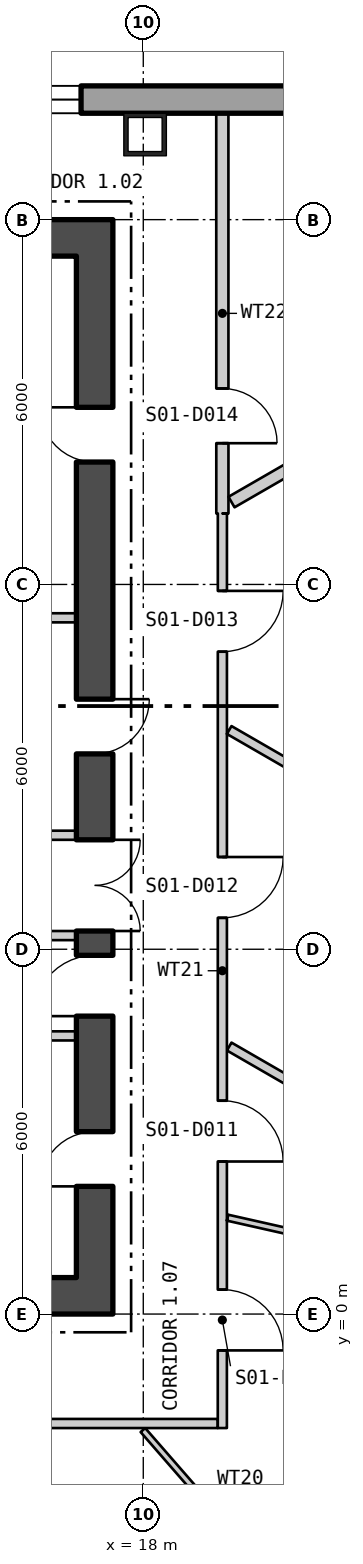
"""IFC4 building model, lengths in metres.
Left out: names, types, materials, properties, quantities, classifications, styles, units other than length and angle.
Written with IfcOpenShell. Run it as: python <this file> out.ifc"""

import sys

from ifc_helpers import new_model, si_unit, direction, frame, frame_2d, origin, origin_2d, place, context, subcontext, project, spatial, polyline, rectangle, hollow_rectangle, outline, extrude, element, fill, save


model = new_model("IFC4")
c1 = context("Model", 3, precision=1e-05, world=origin(), true_north=direction((0.0, 1.0)))
c2 = subcontext(c1, "Body", "Model", "MODEL_VIEW")
j1 = project(units=[si_unit("LENGTHUNIT", "METRE"), si_unit("PLANEANGLEUNIT", "RADIAN")], contexts=[c1])
p1 = place(None, origin())
s1 = spatial("IfcSite", under=j1, at=p1, CompositionType="ELEMENT")
p2 = place(p1, origin())
s2 = spatial("IfcBuilding", under=s1, at=p2, CompositionType="ELEMENT")
p3 = place(p2, frame((0.0, 0.0, 28.8)))
s3 = spatial("IfcBuildingStorey", under=s2, at=p3, CompositionType="ELEMENT", Elevation=28.8)
p4 = place(p3, frame((18.03, 19.4, -0.85), z_axis=(0.0, 0.0, 1.0), x_axis=(-1.0, 0.0, 0.0)))
e1 = element("IfcColumn", 1, at=p4, inside=s3, PredefinedType="COLUMN", context=c2, shape_type="SweptSolid", body=[
    extrude(hollow_rectangle(XDim=0.7, YDim=0.7, WallThickness=0.07, at=origin_2d()), origin(), (0.0, 0.0, 1.0), 5.35),
])
p5 = place(p3, frame((22.87, 19.975, -0.4), z_axis=(0.0, 0.0, 1.0), x_axis=(-1.0, 0.0, 0.0)))
e2 = element("IfcWall", 2, at=p5, inside=s3, PredefinedType="SOLIDWALL", context=c2, shape_type="SweptSolid", body=[
    extrude(outline(polyline([(-0.13, -0.225), (45.87, -0.225), (45.61, 0.225), (0.13, 0.225), (-0.13, -0.225)])), origin(), (0.0, 0.0, 1.0), 4.5),
])
p6 = place(p5, frame((5.893, 0.0, 1.3)))
e3 = element("IfcOpeningElement", 3, at=p6, cuts=e2, PredefinedType="OPENING", context=c2, shape_type="SweptSolid", body=[
    extrude(rectangle(XDim=2.4, YDim=2.6, at=frame_2d((1.2, 1.3))), frame((0.0, 0.235, 0.0), z_axis=(0.0, -1.0, 0.0), x_axis=(1.0, 0.0, 0.0)), (0.0, 0.0, 1.0), 0.47),
])
p7 = place(p5, frame((10.401, 0.0, 1.3)))
e4 = element("IfcOpeningElement", 4, at=p7, cuts=e2, PredefinedType="OPENING", context=c2, shape_type="SweptSolid", body=[
    extrude(rectangle(XDim=2.4, YDim=2.6, at=frame_2d((1.2, 1.3))), frame((0.0, 0.235, 0.0), z_axis=(0.0, -1.0, 0.0), x_axis=(1.0, 0.0, 0.0)), (0.0, 0.0, 1.0), 0.47),
])
p8 = place(p5, frame((14.909, 0.0, 1.3)))
e5 = element("IfcOpeningElement", 5, at=p8, cuts=e2, PredefinedType="OPENING", context=c2, shape_type="SweptSolid", body=[
    extrude(rectangle(XDim=2.4, YDim=2.6, at=frame_2d((1.2, 1.3))), frame((0.0, 0.235, 0.0), z_axis=(0.0, -1.0, 0.0), x_axis=(1.0, 0.0, 0.0)), (0.0, 0.0, 1.0), 0.47),
])
p9 = place(p5, frame((19.416, 0.0, 1.3)))
e6 = element("IfcOpeningElement", 6, at=p9, cuts=e2, PredefinedType="OPENING", context=c2, shape_type="SweptSolid", body=[
    extrude(rectangle(XDim=2.4, YDim=2.6, at=frame_2d((1.2, 1.3))), frame((0.0, 0.235, 0.0), z_axis=(0.0, -1.0, 0.0), x_axis=(1.0, 0.0, 0.0)), (0.0, 0.0, 1.0), 0.47),
])
p10 = place(p5, frame((23.924, 0.0, 1.3)))
e7 = element("IfcOpeningElement", 7, at=p10, cuts=e2, PredefinedType="OPENING", context=c2, shape_type="SweptSolid", body=[
    extrude(rectangle(XDim=2.4, YDim=2.6, at=frame_2d((1.2, 1.3))), frame((0.0, 0.235, 0.0), z_axis=(0.0, -1.0, 0.0), x_axis=(1.0, 0.0, 0.0)), (0.0, 0.0, 1.0), 0.47),
])
p11 = place(p5, frame((28.431, 0.0, 1.3)))
e8 = element("IfcOpeningElement", 8, at=p11, cuts=e2, PredefinedType="OPENING", context=c2, shape_type="SweptSolid", body=[
    extrude(rectangle(XDim=2.4, YDim=2.6, at=frame_2d((1.2, 1.3))), frame((0.0, 0.235, 0.0), z_axis=(0.0, -1.0, 0.0), x_axis=(1.0, 0.0, 0.0)), (0.0, 0.0, 1.0), 0.47),
])
p12 = place(p5, frame((32.939, 0.0, 1.3)))
e9 = element("IfcOpeningElement", 9, at=p12, cuts=e2, PredefinedType="OPENING", context=c2, shape_type="SweptSolid", body=[
    extrude(rectangle(XDim=2.4, YDim=2.6, at=frame_2d((1.2, 1.3))), frame((0.0, 0.235, 0.0), z_axis=(0.0, -1.0, 0.0), x_axis=(1.0, 0.0, 0.0)), (0.0, 0.0, 1.0), 0.47),
])
p13 = place(p5, frame((37.447, 0.0, 1.3)))
e10 = element("IfcOpeningElement", 10, at=p13, cuts=e2, PredefinedType="OPENING", context=c2, shape_type="SweptSolid", body=[
    extrude(rectangle(XDim=2.4, YDim=2.6, at=frame_2d((1.2, 1.3))), frame((0.0, 0.235, 0.0), z_axis=(0.0, -1.0, 0.0), x_axis=(1.0, 0.0, 0.0)), (0.0, 0.0, 1.0), 0.47),
])
p14 = place(p3, frame((5.87, -29.805, -0.23), z_axis=(0.0, 0.0, 1.0), x_axis=(0.499999764979, 0.866025539474, 0.0)))
e11 = element("IfcWall", 11, at=p14, inside=s3, PredefinedType="SOLIDWALL", context=c2, shape_type="SweptSolid", body=[
    extrude(outline(polyline([(-0.13, -0.225), (45.87, -0.225), (45.61, 0.225), (0.13, 0.225), (-0.13, -0.225)])), origin(), (0.0, 0.0, 1.0), 4.55),
])
p15 = place(p14, frame((1.424, 0.0, 1.13)))
e12 = element("IfcOpeningElement", 12, at=p15, cuts=e11, PredefinedType="OPENING", context=c2, shape_type="SweptSolid", body=[
    extrude(rectangle(XDim=2.4, YDim=2.6, at=frame_2d((1.2, 1.3))), frame((0.0, 0.235, 0.0), z_axis=(0.0, -1.0, 0.0), x_axis=(1.0, 0.0, 0.0)), (0.0, 0.0, 1.0), 0.47),
])
p16 = place(p14, frame((5.893, 0.0, 1.13)))
e13 = element("IfcOpeningElement", 13, at=p16, cuts=e11, PredefinedType="OPENING", context=c2, shape_type="SweptSolid", body=[
    extrude(rectangle(XDim=2.4, YDim=2.6, at=frame_2d((1.2, 1.3))), frame((0.0, 0.235, 0.0), z_axis=(0.0, -1.0, 0.0), x_axis=(1.0, 0.0, 0.0)), (0.0, 0.0, 1.0), 0.47),
])
p17 = place(p14, frame((10.701, 0.0, 0.23)))
e14 = element("IfcOpeningElement", 14, at=p17, cuts=e11, PredefinedType="OPENING", context=c2, shape_type="SweptSolid", body=[
    extrude(rectangle(XDim=1.8, YDim=2.4, at=frame_2d((0.9, 1.2))), frame((0.0, 0.235, 0.0), z_axis=(0.0, -1.0, 0.0), x_axis=(1.0, 0.0, 0.0)), (0.0, 0.0, 1.0), 0.47),
])
p18 = place(p14, frame((14.909, 0.0, 1.13)))
e15 = element("IfcOpeningElement", 15, at=p18, cuts=e11, PredefinedType="OPENING", context=c2, shape_type="SweptSolid", body=[
    extrude(rectangle(XDim=2.4, YDim=2.6, at=frame_2d((1.2, 1.3))), frame((0.0, 0.235, 0.0), z_axis=(0.0, -1.0, 0.0), x_axis=(1.0, 0.0, 0.0)), (0.0, 0.0, 1.0), 0.47),
])
p19 = place(p14, frame((19.416, 0.0, 1.13)))
e16 = element("IfcOpeningElement", 16, at=p19, cuts=e11, PredefinedType="OPENING", context=c2, shape_type="SweptSolid", body=[
    extrude(rectangle(XDim=2.4, YDim=2.6, at=frame_2d((1.2, 1.3))), frame((0.0, 0.235, 0.0), z_axis=(0.0, -1.0, 0.0), x_axis=(1.0, 0.0, 0.0)), (0.0, 0.0, 1.0), 0.47),
])
p20 = place(p14, frame((23.924, 0.0, 1.13)))
e17 = element("IfcOpeningElement", 17, at=p20, cuts=e11, PredefinedType="OPENING", context=c2, shape_type="SweptSolid", body=[
    extrude(rectangle(XDim=2.4, YDim=2.6, at=frame_2d((1.2, 1.3))), frame((0.0, 0.235, 0.0), z_axis=(0.0, -1.0, 0.0), x_axis=(1.0, 0.0, 0.0)), (0.0, 0.0, 1.0), 0.47),
])
p21 = place(p14, frame((37.447, 0.0, 1.13)))
e18 = element("IfcOpeningElement", 18, at=p21, cuts=e11, PredefinedType="OPENING", context=c2, shape_type="SweptSolid", body=[
    extrude(rectangle(XDim=2.4, YDim=2.6, at=frame_2d((1.2, 1.3))), frame((0.0, 0.235, 0.0), z_axis=(0.0, -1.0, 0.0), x_axis=(1.0, 0.0, 0.0)), (0.0, 0.0, 1.0), 0.47),
])
p22 = place(p14, frame((42.216, 0.0, 0.23)))
e19 = element("IfcOpeningElement", 19, at=p22, cuts=e11, PredefinedType="OPENING", context=c2, shape_type="SweptSolid", body=[
    extrude(rectangle(XDim=1.8, YDim=2.4, at=frame_2d((0.9, 1.2))), frame((0.0, 0.235, 0.0), z_axis=(0.0, -1.0, 0.0), x_axis=(1.0, 0.0, 0.0)), (0.0, 0.0, 1.0), 0.47),
])
p23 = place(p3, frame((-17.5, 0.3, 0.0), z_axis=(0.0, 0.0, 1.0), x_axis=(1.0, 0.0, 0.0)))
e20 = element("IfcWall", 20, at=p23, inside=s3, PredefinedType="SHEAR", context=c2, shape_type="SweptSolid", body=[
    extrude(rectangle(XDim=35.0, YDim=0.6, at=frame_2d((17.5, 0.0))), origin(), (0.0, 0.0, 1.0), 4.3),
])
p24 = place(p23, frame((12.0, 0.0, 0.0)))
e21 = element("IfcOpeningElement", 21, at=p24, cuts=e20, PredefinedType="OPENING", context=c2, shape_type="SweptSolid", body=[
    extrude(rectangle(XDim=1.8, YDim=2.4, at=frame_2d((0.9, 1.2))), frame((0.0, 0.31, 0.0), z_axis=(0.0, -1.0, 0.0), x_axis=(1.0, 0.0, 0.0)), (0.0, 0.0, 1.0), 0.62),
])
p25 = place(p23, frame((22.0, 0.0, 0.0)))
e22 = element("IfcOpeningElement", 22, at=p25, cuts=e20, PredefinedType="OPENING", context=c2, shape_type="SweptSolid", body=[
    extrude(rectangle(XDim=1.8, YDim=2.4, at=frame_2d((0.9, 1.2))), frame((0.0, 0.31, 0.0), z_axis=(0.0, -1.0, 0.0), x_axis=(1.0, 0.0, 0.0)), (0.0, 0.0, 1.0), 0.62),
])
p26 = place(p3, frame((-17.5, 17.7, 0.0), z_axis=(0.0, 0.0, 1.0), x_axis=(1.0, 0.0, 0.0)))
e23 = element("IfcWall", 23, at=p26, inside=s3, PredefinedType="SHEAR", context=c2, shape_type="SweptSolid", body=[
    extrude(rectangle(XDim=35.0, YDim=0.6, at=frame_2d((17.5, 0.0))), origin(), (0.0, 0.0, 1.0), 4.3),
])
p27 = place(p3, frame((17.2, 0.6, 0.0), z_axis=(0.0, 0.0, 1.0), x_axis=(0.0, 1.0, 0.0)))
e24 = element("IfcWall", 24, at=p27, inside=s3, PredefinedType="SHEAR", context=c2, shape_type="SweptSolid", body=[
    extrude(rectangle(XDim=16.8, YDim=0.6, at=frame_2d((8.4, 0.0))), origin(), (0.0, 0.0, 1.0), 4.3),
])
p28 = place(p27, frame((5.7, 0.0, 0.0)))
e25 = element("IfcOpeningElement", 25, at=p28, cuts=e24, PredefinedType="OPENING", context=c2, shape_type="SweptSolid", body=[
    extrude(rectangle(XDim=1.5, YDim=2.1, at=frame_2d((0.75, 1.05))), frame((0.0, 0.31, 0.0), z_axis=(0.0, -1.0, 0.0), x_axis=(1.0, 0.0, 0.0)), (0.0, 0.0, 1.0), 0.62),
])
p29 = place(p27, frame((1.5, 0.0, 0.0)))
e26 = element("IfcOpeningElement", 26, at=p29, cuts=e24, PredefinedType="OPENING", context=c2, shape_type="SweptSolid", body=[
    extrude(rectangle(XDim=0.9, YDim=2.1, at=frame_2d((0.45, 1.05))), frame((0.0, 0.31, 0.0), z_axis=(0.0, -1.0, 0.0), x_axis=(1.0, 0.0, 0.0)), (0.0, 0.0, 1.0), 0.62),
])
p30 = place(p27, frame((4.3, 0.0, 0.0)))
e27 = element("IfcOpeningElement", 27, at=p30, cuts=e24, PredefinedType="OPENING", context=c2, shape_type="SweptSolid", body=[
    extrude(rectangle(XDim=1.0, YDim=2.1, at=frame_2d((0.5, 1.05))), frame((0.0, 0.31, 0.0), z_axis=(0.0, -1.0, 0.0), x_axis=(1.0, 0.0, 0.0)), (0.0, 0.0, 1.0), 0.62),
])
p31 = place(p27, frame((8.613, 0.0, 0.0)))
e28 = element("IfcOpeningElement", 28, at=p31, cuts=e24, PredefinedType="OPENING", context=c2, shape_type="SweptSolid", body=[
    extrude(rectangle(XDim=0.9, YDim=2.1, at=frame_2d((0.45, 1.05))), frame((0.0, 0.31, 0.0), z_axis=(0.0, -1.0, 0.0), x_axis=(1.0, 0.0, 0.0)), (0.0, 0.0, 1.0), 0.62),
])
p32 = place(p27, frame((13.413, 0.0, 0.0)))
e29 = element("IfcOpeningElement", 29, at=p32, cuts=e24, PredefinedType="OPENING", context=c2, shape_type="SweptSolid", body=[
    extrude(rectangle(XDim=0.9, YDim=2.1, at=frame_2d((0.45, 1.05))), frame((0.0, 0.31, 0.0), z_axis=(0.0, -1.0, 0.0), x_axis=(1.0, 0.0, 0.0)), (0.0, 0.0, 1.0), 0.62),
])
for number, where, z_axis, x_axis in (
    (30, (14.5, 6.225, 0.0), (0.0, 0.0, 1.0), (1.0, 0.0, 0.0)),
    (31, (14.5, 7.875, 0.0), (0.0, 0.0, 1.0), (1.0, 0.0, 0.0)),
    (32, (14.5, 4.575, 0.0), (0.0, 0.0, 1.0), (1.0, 0.0, 0.0)),
    (33, (14.5, 11.451, 0.0), (0.0, 0.0, 1.0), (1.0, 0.0, 0.0)),
):
    element("IfcWall", number, at=place(p3, frame(where, z_axis=z_axis, x_axis=x_axis)), inside=s3, PredefinedType="PARTITIONING", context=c2, shape_type="SweptSolid", body=[
        extrude(rectangle(XDim=2.4, YDim=0.15, at=frame_2d((1.2, 0.0))), origin(), (0.0, 0.0, 1.0), 4.3),
    ])
p33 = place(p3, frame((8.075, -1.8, 0.0), z_axis=(0.0, 0.0, 1.0), x_axis=(1.0, 0.0, 0.0)))
e34 = element("IfcWall", 34, at=p33, inside=s3, PredefinedType="PARTITIONING", context=c2, shape_type="SweptSolid", body=[
    extrude(rectangle(XDim=11.15, YDim=0.15, at=frame_2d((5.575, 0.0))), origin(), (0.0, 0.0, 1.0), 4.3),
])
p34 = place(p33, frame((2.845, 0.0, 0.0)))
e35 = element("IfcOpeningElement", 35, at=p34, cuts=e34, PredefinedType="OPENING", context=c2, shape_type="SweptSolid", body=[
    extrude(rectangle(XDim=1.0, YDim=2.1, at=frame_2d((0.5, 1.05))), frame((0.0, 0.085, 0.0), z_axis=(0.0, -1.0, 0.0), x_axis=(1.0, 0.0, 0.0)), (0.0, 0.0, 1.0), 0.17),
])
p35 = place(p33, frame((6.395, 0.0, 0.0)))
e36 = element("IfcOpeningElement", 36, at=p35, cuts=e34, PredefinedType="OPENING", context=c2, shape_type="SweptSolid", body=[
    extrude(rectangle(XDim=1.0, YDim=2.1, at=frame_2d((0.5, 1.05))), frame((0.0, 0.085, 0.0), z_axis=(0.0, -1.0, 0.0), x_axis=(1.0, 0.0, 0.0)), (0.0, 0.0, 1.0), 0.17),
])
p36 = place(p3, frame((12.326, -1.918, 0.0), z_axis=(0.0, 0.0, 1.0), x_axis=(0.866014233227, -0.500019347474, 0.0)))
e37 = element("IfcWall", 37, at=p36, inside=s3, PredefinedType="PARTITIONING", context=c2, shape_type="SweptSolid", body=[
    extrude(rectangle(XDim=7.678, YDim=0.1, at=frame_2d((3.839, 0.0))), origin(), (0.0, 0.0, 1.0), 4.3),
])
p37 = place(p3, frame((17.994, -1.908, 0.0), z_axis=(0.0, 0.0, 1.0), x_axis=(0.656716151121, -0.754137850036, 0.0)))
e38 = element("IfcWall", 38, at=p37, inside=s3, PredefinedType="PARTITIONING", context=c2, shape_type="SweptSolid", body=[
    extrude(rectangle(XDim=3.408, YDim=0.1, at=frame_2d((1.704, 0.0))), origin(), (0.0, 0.0, 1.0), 4.3),
])
p38 = place(p3, frame((19.3, -1.875, 0.0), z_axis=(0.0, 0.0, 1.0), x_axis=(6.6476102e-05, 0.99999999779, 0.0)))
e39 = element("IfcWall", 39, at=p38, inside=s3, PredefinedType="PARTITIONING", context=c2, shape_type="SweptSolid", body=[
    extrude(rectangle(XDim=15.043, YDim=0.15, at=frame_2d((7.521, 0.0))), origin(), (0.0, 0.0, 1.0), 4.3),
])
p39 = place(p38, frame((1.277, 0.0, 0.0)))
e40 = element("IfcOpeningElement", 40, at=p39, cuts=e39, PredefinedType="OPENING", context=c2, shape_type="SweptSolid", body=[
    extrude(rectangle(XDim=1.0, YDim=2.1, at=frame_2d((0.5, 1.05))), frame((0.0, 0.085, 0.0), z_axis=(0.0, -1.0, 0.0), x_axis=(1.0, 0.0, 0.0)), (0.0, 0.0, 1.0), 0.17),
])
p40 = place(p38, frame((4.384, 0.0, 0.0)))
e41 = element("IfcOpeningElement", 41, at=p40, cuts=e39, PredefinedType="OPENING", context=c2, shape_type="SweptSolid", body=[
    extrude(rectangle(XDim=1.0, YDim=2.1, at=frame_2d((0.5, 1.05))), frame((0.0, 0.085, 0.0), z_axis=(0.0, -1.0, 0.0), x_axis=(1.0, 0.0, 0.0)), (0.0, 0.0, 1.0), 0.17),
])
p41 = place(p38, frame((8.392, 0.0, 0.0)))
e42 = element("IfcOpeningElement", 42, at=p41, cuts=e39, PredefinedType="OPENING", context=c2, shape_type="SweptSolid", body=[
    extrude(rectangle(XDim=1.0, YDim=2.1, at=frame_2d((0.5, 1.05))), frame((0.0, 0.085, 0.0), z_axis=(0.0, -1.0, 0.0), x_axis=(1.0, 0.0, 0.0)), (0.0, 0.0, 1.0), 0.17),
])
p42 = place(p38, frame((12.769, 0.0, 0.0)))
e43 = element("IfcOpeningElement", 43, at=p42, cuts=e39, PredefinedType="OPENING", context=c2, shape_type="SweptSolid", body=[
    extrude(rectangle(XDim=1.0, YDim=2.1, at=frame_2d((0.5, 1.05))), frame((0.0, 0.085, 0.0), z_axis=(0.0, -1.0, 0.0), x_axis=(1.0, 0.0, 0.0)), (0.0, 0.0, 1.0), 0.17),
])
p43 = place(p3, frame((19.3, 19.749, 0.0), z_axis=(0.0, 0.0, 1.0), x_axis=(0.000151952589, -0.999999988455, 0.0)))
e44 = element("IfcWall", 44, at=p43, inside=s3, PredefinedType="PARTITIONING", context=c2, shape_type="SweptSolid", body=[
    extrude(rectangle(XDim=6.581, YDim=0.2, at=frame_2d((3.291, 0.0))), origin(), (0.0, 0.0, 1.0), 4.3),
])
p44 = place(p43, frame((4.526, 0.0, 0.0)))
e45 = element("IfcOpeningElement", 45, at=p44, cuts=e44, PredefinedType="OPENING", context=c2, shape_type="SweptSolid", body=[
    extrude(rectangle(XDim=0.9, YDim=2.1, at=frame_2d((0.45, 1.05))), frame((0.0, 0.11, 0.0), z_axis=(0.0, -1.0, 0.0), x_axis=(1.0, 0.0, 0.0)), (0.0, 0.0, 1.0), 0.22),
])
p45 = place(p3, frame((19.386, 1.585, 0.0), z_axis=(0.0, 0.0, 1.0), x_axis=(0.975507775366, -0.219964952209, 0.0)))
e46 = element("IfcWall", 46, at=p45, inside=s3, PredefinedType="PARTITIONING", context=c2, shape_type="SweptSolid", body=[
    extrude(rectangle(XDim=3.942, YDim=0.1, at=frame_2d((1.971, 0.0))), origin(), (0.0, 0.0, 1.0), 4.3),
])
p46 = place(p3, frame((19.413, 4.4, 0.0), z_axis=(0.0, 0.0, 1.0), x_axis=(0.865955197451, -0.500121581226, 0.0)))
e47 = element("IfcWall", 47, at=p46, inside=s3, PredefinedType="PARTITIONING", context=c2, shape_type="SweptSolid", body=[
    extrude(rectangle(XDim=4.699, YDim=0.15, at=frame_2d((2.349, 0.0))), origin(), (0.0, 0.0, 1.0), 4.3),
])
p47 = place(p3, frame((19.413, 9.606, 0.0), z_axis=(0.0, 0.0, 1.0), x_axis=(0.865941524513, -0.500145255025, 0.0)))
e48 = element("IfcWall", 48, at=p47, inside=s3, PredefinedType="PARTITIONING", context=c2, shape_type="SweptSolid", body=[
    extrude(rectangle(XDim=7.302, YDim=0.15, at=frame_2d((3.651, 0.0))), origin(), (0.0, 0.0, 1.0), 4.3),
])
p48 = place(p3, frame((19.451, 13.355, 0.0), z_axis=(0.0, 0.0, 1.0), x_axis=(0.866135007536, 0.499810112663, 0.0)))
e49 = element("IfcWall", 49, at=p48, inside=s3, PredefinedType="PARTITIONING", context=c2, shape_type="SweptSolid", body=[
    extrude(rectangle(XDim=5.596, YDim=0.2, at=frame_2d((2.798, 0.0))), origin(), (0.0, 0.0, 1.0), 4.3),
])
p49 = place(p6, origin())
e50 = element("IfcWindow", 50, at=p49, inside=s3, PartitioningType="SINGLE_PANEL", PredefinedType="WINDOW", context=c2, shape_type="SweptSolid", body=[
    extrude(rectangle(XDim=2.4, YDim=2.6, at=frame_2d((1.2, 1.3))), frame((0.0, 0.105, 0.0), z_axis=(0.0, -1.0, 0.0), x_axis=(1.0, 0.0, 0.0)), (0.0, 0.0, 1.0), 0.06),
])
fill(e3, e50)
p50 = place(p28, origin())
e51 = element("IfcDoor", 51, at=p50, inside=s3, OperationType="DOUBLE_DOOR_SINGLE_SWING", PredefinedType="DOOR", context=c2, shape_type="SweptSolid", body=[
    extrude(rectangle(XDim=1.5, YDim=2.1, at=frame_2d((0.75, 1.05))), frame((0.0, 0.025, 0.0), z_axis=(0.0, -1.0, 0.0), x_axis=(1.0, 0.0, 0.0)), (0.0, 0.0, 1.0), 0.05),
])
fill(e25, e51)
p51 = place(p29, origin())
e52 = element("IfcDoor", 52, at=p51, inside=s3, OperationType="SINGLE_SWING_RIGHT", PredefinedType="DOOR", context=c2, shape_type="SweptSolid", body=[
    extrude(rectangle(XDim=0.9, YDim=2.1, at=frame_2d((0.45, 1.05))), frame((0.0, 0.025, 0.0), z_axis=(0.0, -1.0, 0.0), x_axis=(1.0, 0.0, 0.0)), (0.0, 0.0, 1.0), 0.05),
])
fill(e26, e52)
p52 = place(p30, origin())
e53 = element("IfcDoor", 53, at=p52, inside=s3, OperationType="SINGLE_SWING_RIGHT", PredefinedType="DOOR", context=c2, shape_type="SweptSolid", body=[
    extrude(rectangle(XDim=1.0, YDim=2.1, at=frame_2d((0.5, 1.05))), frame((0.0, 0.025, 0.0), z_axis=(0.0, -1.0, 0.0), x_axis=(1.0, 0.0, 0.0)), (0.0, 0.0, 1.0), 0.05),
])
fill(e27, e53)
p53 = place(p31, origin())
e54 = element("IfcDoor", 54, at=p53, inside=s3, OperationType="SINGLE_SWING_RIGHT", PredefinedType="DOOR", context=c2, shape_type="SweptSolid", body=[
    extrude(rectangle(XDim=0.9, YDim=2.1, at=frame_2d((0.45, 1.05))), frame((0.0, 0.025, 0.0), z_axis=(0.0, -1.0, 0.0), x_axis=(1.0, 0.0, 0.0)), (0.0, 0.0, 1.0), 0.05),
])
fill(e28, e54)
p54 = place(p32, origin())
e55 = element("IfcDoor", 55, at=p54, inside=s3, OperationType="SINGLE_SWING_LEFT", PredefinedType="DOOR", context=c2, shape_type="SweptSolid", body=[
    extrude(rectangle(XDim=0.9, YDim=2.1, at=frame_2d((0.45, 1.05))), frame((0.0, 0.025, 0.0), z_axis=(0.0, -1.0, 0.0), x_axis=(1.0, 0.0, 0.0)), (0.0, 0.0, 1.0), 0.05),
])
fill(e29, e55)
p55 = place(p39, origin())
e56 = element("IfcDoor", 56, at=p55, inside=s3, OperationType="SINGLE_SWING_LEFT", PredefinedType="DOOR", context=c2, shape_type="SweptSolid", body=[
    extrude(rectangle(XDim=1.0, YDim=2.1, at=frame_2d((0.5, 1.05))), frame((0.0, 0.025, 0.0), z_axis=(0.0, -1.0, 0.0), x_axis=(1.0, 0.0, 0.0)), (0.0, 0.0, 1.0), 0.05),
])
fill(e40, e56)
p56 = place(p40, origin())
e57 = element("IfcDoor", 57, at=p56, inside=s3, OperationType="SINGLE_SWING_LEFT", PredefinedType="DOOR", context=c2, shape_type="SweptSolid", body=[
    extrude(rectangle(XDim=1.0, YDim=2.1, at=frame_2d((0.5, 1.05))), frame((0.0, 0.025, 0.0), z_axis=(0.0, -1.0, 0.0), x_axis=(1.0, 0.0, 0.0)), (0.0, 0.0, 1.0), 0.05),
])
fill(e41, e57)
p57 = place(p41, origin())
e58 = element("IfcDoor", 58, at=p57, inside=s3, OperationType="SINGLE_SWING_RIGHT", PredefinedType="DOOR", context=c2, shape_type="SweptSolid", body=[
    extrude(rectangle(XDim=1.0, YDim=2.1, at=frame_2d((0.5, 1.05))), frame((0.0, 0.025, 0.0), z_axis=(0.0, -1.0, 0.0), x_axis=(1.0, 0.0, 0.0)), (0.0, 0.0, 1.0), 0.05),
])
fill(e42, e58)
p58 = place(p42, origin())
e59 = element("IfcDoor", 59, at=p58, inside=s3, OperationType="SINGLE_SWING_RIGHT", PredefinedType="DOOR", context=c2, shape_type="SweptSolid", body=[
    extrude(rectangle(XDim=1.0, YDim=2.1, at=frame_2d((0.5, 1.05))), frame((0.0, 0.025, 0.0), z_axis=(0.0, -1.0, 0.0), x_axis=(1.0, 0.0, 0.0)), (0.0, 0.0, 1.0), 0.05),
])
fill(e43, e59)
p59 = place(p44, origin())
e60 = element("IfcDoor", 60, at=p59, inside=s3, OperationType="SINGLE_SWING_LEFT", PredefinedType="DOOR", context=c2, shape_type="SweptSolid", body=[
    extrude(rectangle(XDim=0.9, YDim=2.1, at=frame_2d((0.45, 1.05))), frame((0.0, 0.025, 0.0), z_axis=(0.0, -1.0, 0.0), x_axis=(1.0, 0.0, 0.0)), (0.0, 0.0, 1.0), 0.05),
])
fill(e45, e60)
save(model, sys.argv[1])
